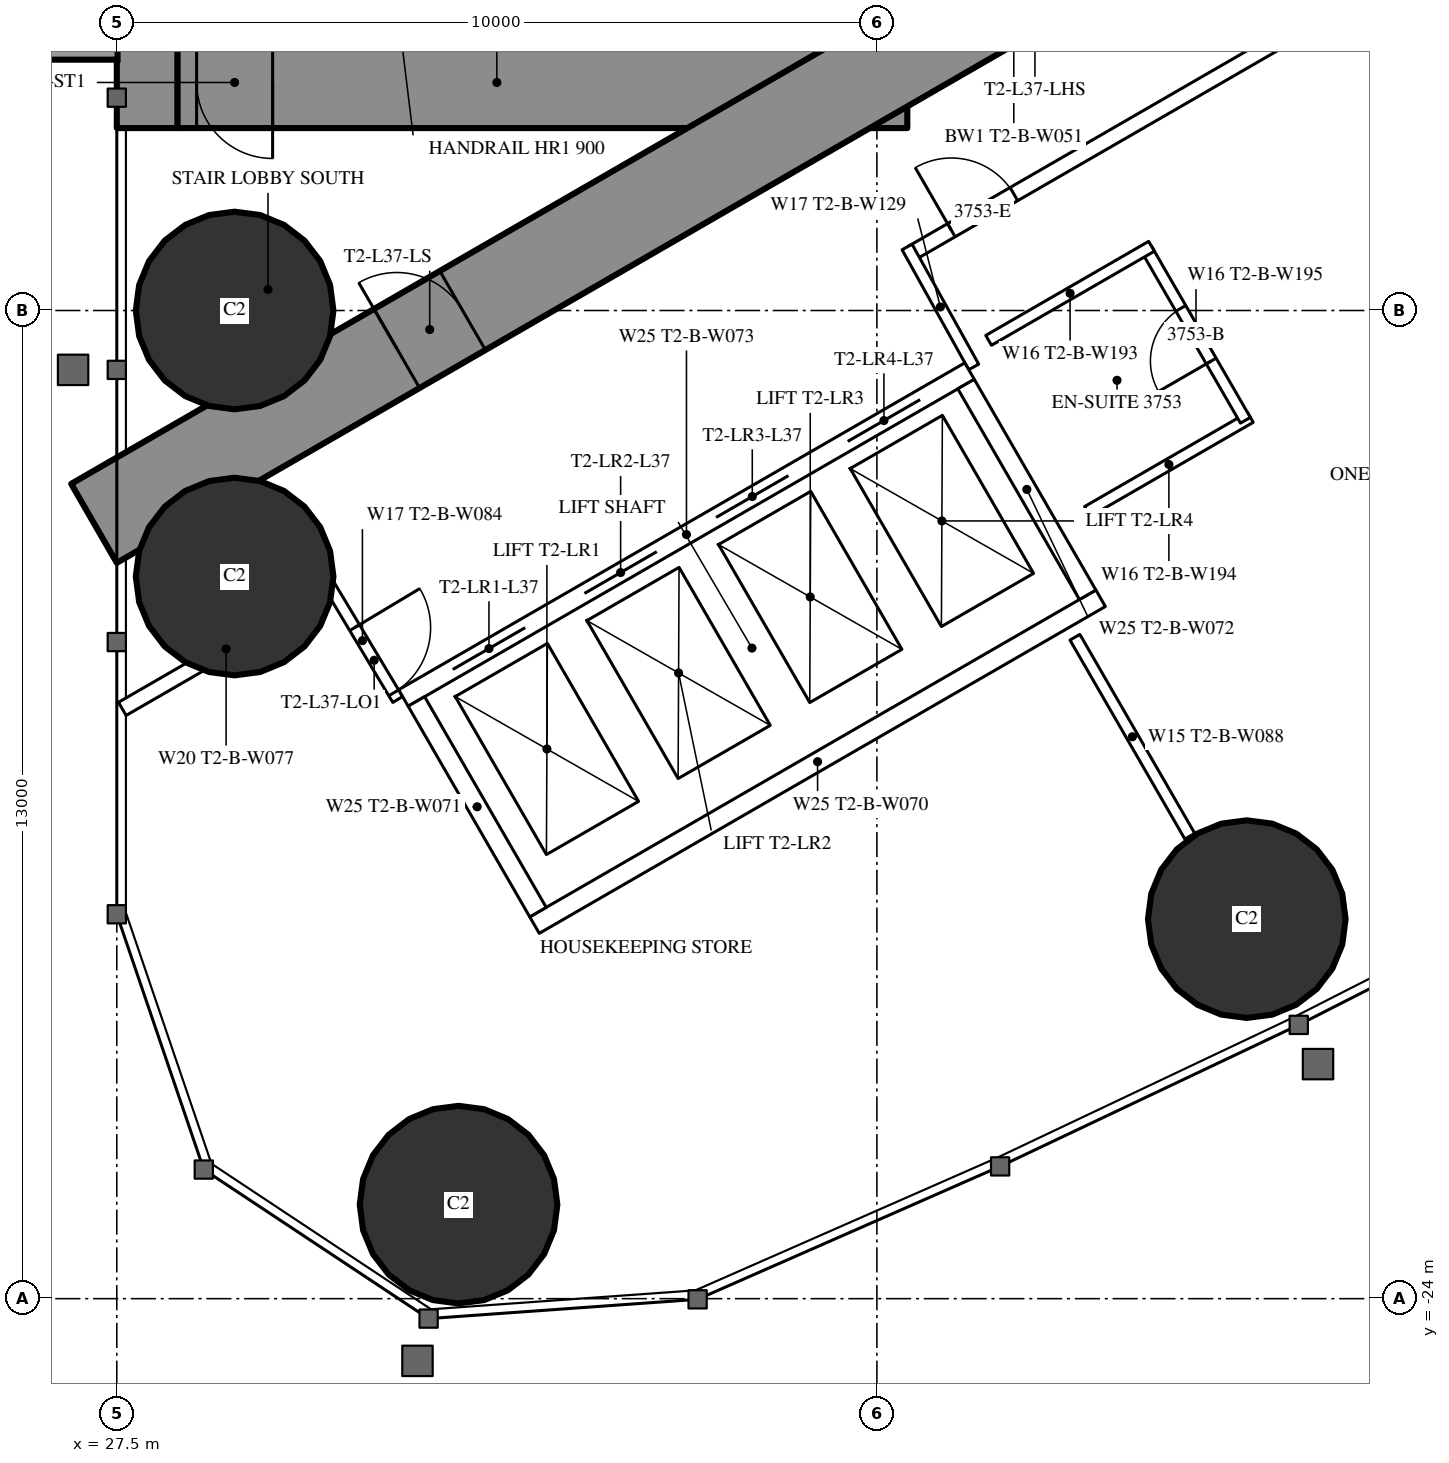
"""IFC4 building model, lengths in metres.
Left out: names, types, materials, properties, quantities, classifications, styles, units other than length and angle.
Written with IfcOpenShell. Run it as: python <this file> out.ifc"""

import sys

from ifc_helpers import new_model, si_unit, direction, frame, frame_2d, origin, origin_2d, place, context, subcontext, project, spatial, rectangle, hollow_circle, extrude, element, fill, save


model = new_model("IFC4")
c1 = context("Model", 3, precision=1e-05, world=origin(), true_north=direction((0.0, 1.0)))
c2 = subcontext(c1, "Body", "Model", "MODEL_VIEW")
j1 = project(units=[si_unit("LENGTHUNIT", "METRE"), si_unit("PLANEANGLEUNIT", "RADIAN")], contexts=[c1])
p1 = place(None, origin())
s1 = spatial("IfcSite", under=j1, at=p1, CompositionType="ELEMENT")
p2 = place(p1, origin())
s2 = spatial("IfcBuilding", under=s1, at=p2, CompositionType="ELEMENT")
p3 = place(p2, frame((0.0, 0.0, 139.6)))
s3 = spatial("IfcBuildingStorey", under=s2, at=p3, CompositionType="ELEMENT", Elevation=139.6)
for number, where, z_axis, x_axis in (
    (1, (31.996, -22.763, 0.0), (0.0, 0.0, 1.0), (1.0, 0.0, 0.0)),
    (2, (29.05, -11.0, 0.0), (0.0, 0.0, 1.0), (1.0, 0.0, 0.0)),
    (3, (29.05, -14.5, 0.0), (0.0, 0.0, 1.0), (1.0, 0.0, 0.0)),
    (4, (42.366, -19.007, 0.0), (0.0, 0.0, 1.0), (1.0, 0.0, 0.0)),
):
    element("IfcColumn", number, at=place(p3, frame(where, z_axis=z_axis, x_axis=x_axis)), inside=s3, PredefinedType="COLUMN", context=c2, shape_type="SweptSolid", body=[
        extrude(hollow_circle(Radius=1.3, WallThickness=0.1, at=origin_2d()), origin(), (0.0, 0.0, 1.0), 3.5),
    ])
p4 = place(p3, frame((27.9, -8.6, 0.0), z_axis=(0.0, 0.0, 1.0), x_axis=(0.0, 1.0, 0.0)))
e5 = element("IfcWall", 5, at=p4, inside=s3, PredefinedType="SHEAR", context=c2, shape_type="SweptSolid", body=[
    extrude(rectangle(XDim=17.2, YDim=0.8, at=frame_2d((8.6, 0.0))), origin(), (0.0, 0.0, 1.0), 3.5),
])
p5 = place(p4, frame((2.45, 0.0, 0.6)))
e6 = element("IfcOpeningElement", 6, at=p5, cuts=e5, PredefinedType="OPENING", context=c2, shape_type="SweptSolid", body=[
    extrude(rectangle(XDim=0.6, YDim=2.1, at=frame_2d((0.3, 1.05))), frame((0.0, 0.41, 0.0), z_axis=(0.0, -1.0, 0.0), x_axis=(1.0, 0.0, 0.0)), (0.0, 0.0, 1.0), 0.82),
])
p6 = place(p4, frame((14.15, 0.0, 0.6)))
e7 = element("IfcOpeningElement", 7, at=p6, cuts=e5, PredefinedType="OPENING", context=c2, shape_type="SweptSolid", body=[
    extrude(rectangle(XDim=0.6, YDim=2.1, at=frame_2d((0.3, 1.05))), frame((0.0, 0.41, 0.0), z_axis=(0.0, -1.0, 0.0), x_axis=(1.0, 0.0, 0.0)), (0.0, 0.0, 1.0), 0.82),
])
p7 = place(p3, frame((37.3, -8.6, 0.0), z_axis=(0.0, 0.0, 1.0), x_axis=(0.0, 1.0, 0.0)))
e8 = element("IfcWall", 8, at=p7, inside=s3, PredefinedType="SHEAR", context=c2, shape_type="SweptSolid", body=[
    extrude(rectangle(XDim=17.2, YDim=1.2, at=frame_2d((8.6, 0.0))), origin(), (0.0, 0.0, 1.0), 3.5),
])
p8 = place(p7, frame((7.7, 0.0, 0.0)))
e9 = element("IfcOpeningElement", 9, at=p8, cuts=e8, PredefinedType="OPENING", context=c2, shape_type="SweptSolid", body=[
    extrude(rectangle(XDim=1.8, YDim=2.2, at=frame_2d((0.9, 1.1))), frame((0.0, 0.61, 0.0), z_axis=(0.0, -1.0, 0.0), x_axis=(1.0, 0.0, 0.0)), (0.0, 0.0, 1.0), 1.22),
])
p9 = place(p3, frame((28.3, -8.0, 0.0), z_axis=(0.0, 0.0, 1.0), x_axis=(1.0, 0.0, 0.0)))
e10 = element("IfcWall", 10, at=p9, inside=s3, PredefinedType="SHEAR", context=c2, shape_type="SweptSolid", body=[
    extrude(rectangle(XDim=8.4, YDim=1.2, at=frame_2d((4.2, 0.0))), origin(), (0.0, 0.0, 1.0), 3.5),
])
p10 = place(p9, frame((0.25, 0.0, 0.0)))
e11 = element("IfcOpeningElement", 11, at=p10, cuts=e10, PredefinedType="OPENING", context=c2, shape_type="SweptSolid", body=[
    extrude(rectangle(XDim=1.0, YDim=2.2, at=frame_2d((0.5, 1.1))), frame((0.0, 0.61, 0.0), z_axis=(0.0, -1.0, 0.0), x_axis=(1.0, 0.0, 0.0)), (0.0, 0.0, 1.0), 1.22),
])
p11 = place(p3, frame((27.2, -13.8, 0.0), z_axis=(0.0, 0.0, 1.0), x_axis=(0.866027159892, 0.499996958321, 0.0)))
e12 = element("IfcWall", 12, at=p11, inside=s3, PredefinedType="SHEAR", context=c2, shape_type="SweptSolid", body=[
    extrude(rectangle(XDim=27.947, YDim=1.2, at=frame_2d((13.973, 0.0))), origin(), (0.0, 0.0, 1.0), 3.5),
])
p12 = place(p11, frame((4.6, 0.0, 0.0)))
e13 = element("IfcOpeningElement", 13, at=p12, cuts=e12, PredefinedType="OPENING", context=c2, shape_type="SweptSolid", body=[
    extrude(rectangle(XDim=1.0, YDim=2.2, at=frame_2d((0.5, 1.1))), frame((0.0, 0.61, 0.0), z_axis=(0.0, -1.0, 0.0), x_axis=(1.0, 0.0, 0.0)), (0.0, 0.0, 1.0), 1.22),
])
p13 = place(p11, frame((13.395, 0.0, 0.0)))
e14 = element("IfcOpeningElement", 14, at=p13, cuts=e12, PredefinedType="OPENING", context=c2, shape_type="SweptSolid", body=[
    extrude(rectangle(XDim=1.8, YDim=2.2, at=frame_2d((0.9, 1.1))), frame((0.0, 0.61, 0.0), z_axis=(0.0, -1.0, 0.0), x_axis=(1.0, 0.0, 0.0)), (0.0, 0.0, 1.0), 1.22),
])
p14 = place(p3, frame((40.105, -15.299, 0.0), z_axis=(0.0, 0.0, 1.0), x_axis=(0.499978822259, -0.866037630414, 0.0)))
e15 = element("IfcWall", 15, at=p14, inside=s3, PredefinedType="PARTITIONING", context=c2, shape_type="SweptSolid", body=[
    extrude(rectangle(XDim=3.023, YDim=0.15, at=frame_2d((1.511, 0.0))), origin(), (0.0, 0.0, 1.0), 3.25),
])
p15 = place(p3, frame((27.572, -16.241, 0.0), z_axis=(0.0, 0.0, 1.0), x_axis=(0.866029654818, 0.499992636921, 0.0)))
e16 = element("IfcWall", 16, at=p15, inside=s3, PredefinedType="PARTITIONING", context=c2, shape_type="SweptSolid", body=[
    extrude(rectangle(XDim=3.155, YDim=0.2, at=frame_2d((1.577, 0.0))), origin(), (0.0, 0.0, 1.0), 3.25),
])
p16 = place(p3, frame((37.96, -10.243, 0.0), z_axis=(0.0, 0.0, 1.0), x_axis=(0.866026429433, 0.499998223521, 0.0)))
e17 = element("IfcWall", 17, at=p16, inside=s3, PredefinedType="PARTITIONING", context=c2, shape_type="SweptSolid", body=[
    extrude(rectangle(XDim=20.487, YDim=0.2, at=frame_2d((10.243, 0.0))), origin(), (0.0, 0.0, 1.0), 3.25),
])
p17 = place(p16, frame((10.743, 0.0, 0.0)))
e18 = element("IfcOpeningElement", 18, at=p17, cuts=e17, PredefinedType="OPENING", context=c2, shape_type="SweptSolid", body=[
    extrude(rectangle(XDim=0.95, YDim=2.2, at=frame_2d((0.475, 1.1))), frame((0.0, 0.11, 0.0), z_axis=(0.0, -1.0, 0.0), x_axis=(1.0, 0.0, 0.0)), (0.0, 0.0, 1.0), 0.22),
])
p18 = place(p16, frame((17.586, 0.0, 0.0)))
e19 = element("IfcOpeningElement", 19, at=p18, cuts=e17, PredefinedType="OPENING", context=c2, shape_type="SweptSolid", body=[
    extrude(rectangle(XDim=1.8, YDim=2.2, at=frame_2d((0.9, 1.1))), frame((0.0, 0.11, 0.0), z_axis=(0.0, -1.0, 0.0), x_axis=(1.0, 0.0, 0.0)), (0.0, 0.0, 1.0), 0.22),
])
p19 = place(p16, frame((0.6, 0.0, 0.0)))
e20 = element("IfcOpeningElement", 20, at=p19, cuts=e17, PredefinedType="OPENING", context=c2, shape_type="SweptSolid", body=[
    extrude(rectangle(XDim=0.95, YDim=2.2, at=frame_2d((0.475, 1.1))), frame((0.0, 0.11, 0.0), z_axis=(0.0, -1.0, 0.0), x_axis=(1.0, 0.0, 0.0)), (0.0, 0.0, 1.0), 0.22),
])
p20 = place(p3, frame((38.773, -11.742, 0.0), z_axis=(0.0, 0.0, 1.0), x_axis=(-0.485528096672, 0.8742210632, 0.0)))
e21 = element("IfcWall", 21, at=p20, inside=s3, PredefinedType="PARTITIONING", context=c2, shape_type="SweptSolid", body=[
    extrude(rectangle(XDim=1.805, YDim=0.15, at=frame_2d((0.903, 0.0))), origin(), (0.0, 0.0, 1.0), 3.25),
])
p21 = place(p3, frame((30.267, -14.569, 0.0), z_axis=(0.0, 0.0, 1.0), x_axis=(0.514336634837, -0.857588377991, 0.0)))
e22 = element("IfcWall", 22, at=p21, inside=s3, PredefinedType="PARTITIONING", context=c2, shape_type="SweptSolid", body=[
    extrude(rectangle(XDim=1.805, YDim=0.15, at=frame_2d((0.903, 0.0))), origin(), (0.0, 0.0, 1.0), 3.25),
])
p22 = place(p21, frame((0.703, 0.0, 0.0)))
e23 = element("IfcOpeningElement", 23, at=p22, cuts=e22, PredefinedType="OPENING", context=c2, shape_type="SweptSolid", body=[
    extrude(rectangle(XDim=1.0, YDim=2.2, at=frame_2d((0.5, 1.1))), frame((0.0, 0.085, 0.0), z_axis=(0.0, -1.0, 0.0), x_axis=(1.0, 0.0, 0.0)), (0.0, 0.0, 1.0), 0.17),
])
p23 = place(p3, frame((40.27, -13.644, 0.0), z_axis=(0.0, 0.0, 1.0), x_axis=(0.866031185235, 0.4999899861, 0.0)))
e24 = element("IfcWall", 24, at=p23, inside=s3, PredefinedType="PARTITIONING", context=c2, shape_type="SweptSolid", body=[
    extrude(rectangle(XDim=2.475, YDim=0.15, at=frame_2d((1.238, 0.0))), origin(), (0.0, 0.0, 1.0), 3.25),
])
p24 = place(p3, frame((41.048, -10.193, 0.0), z_axis=(0.0, 0.0, 1.0), x_axis=(0.500047596559, -0.865997922154, 0.0)))
e25 = element("IfcWall", 25, at=p24, inside=s3, PredefinedType="PARTITIONING", context=c2, shape_type="SweptSolid", body=[
    extrude(rectangle(XDim=2.6, YDim=0.15, at=frame_2d((1.3, 0.0))), origin(), (0.0, 0.0, 1.0), 3.25),
])
p25 = place(p24, frame((0.9, 0.0, 0.0)))
e26 = element("IfcOpeningElement", 26, at=p25, cuts=e25, PredefinedType="OPENING", context=c2, shape_type="SweptSolid", body=[
    extrude(rectangle(XDim=0.8, YDim=2.2, at=frame_2d((0.4, 1.1))), frame((0.0, 0.085, 0.0), z_axis=(0.0, -1.0, 0.0), x_axis=(1.0, 0.0, 0.0)), (0.0, 0.0, 1.0), 0.17),
])
p26 = place(p3, frame((38.97, -11.393, 0.0), z_axis=(0.0, 0.0, 1.0), x_axis=(0.866031185235, 0.4999899861, 0.0)))
e27 = element("IfcWall", 27, at=p26, inside=s3, PredefinedType="PARTITIONING", context=c2, shape_type="SweptSolid", body=[
    extrude(rectangle(XDim=2.475, YDim=0.15, at=frame_2d((1.238, 0.0))), origin(), (0.0, 0.0, 1.0), 3.25),
])
p27 = place(p3, frame((31.271, -16.097, 0.0), z_axis=(0.0, 0.0, 1.0), x_axis=(0.86604045752, 0.499973925258, 0.0)))
e28 = element("IfcWall", 28, at=p27, inside=s3, PredefinedType="PARTITIONING", context=c2, shape_type="SweptSolid", body=[
    extrude(rectangle(XDim=8.6, YDim=0.25, at=frame_2d((4.3, 0.0))), origin(), (0.0, 0.0, 1.0), 3.25),
])
p28 = place(p27, frame((0.75, 0.0, 0.0)))
e29 = element("IfcOpeningElement", 29, at=p28, cuts=e28, PredefinedType="OPENING", context=c2, shape_type="SweptSolid", body=[
    extrude(rectangle(XDim=1.1, YDim=2.2, at=frame_2d((0.55, 1.1))), frame((0.0, 0.135, 0.0), z_axis=(0.0, -1.0, 0.0), x_axis=(1.0, 0.0, 0.0)), (0.0, 0.0, 1.0), 0.27),
])
p29 = place(p27, frame((2.75, 0.0, 0.0)))
e30 = element("IfcOpeningElement", 30, at=p29, cuts=e28, PredefinedType="OPENING", context=c2, shape_type="SweptSolid", body=[
    extrude(rectangle(XDim=1.1, YDim=2.2, at=frame_2d((0.55, 1.1))), frame((0.0, 0.135, 0.0), z_axis=(0.0, -1.0, 0.0), x_axis=(1.0, 0.0, 0.0)), (0.0, 0.0, 1.0), 0.27),
])
p30 = place(p27, frame((4.75, 0.0, 0.0)))
e31 = element("IfcOpeningElement", 31, at=p30, cuts=e28, PredefinedType="OPENING", context=c2, shape_type="SweptSolid", body=[
    extrude(rectangle(XDim=1.1, YDim=2.2, at=frame_2d((0.55, 1.1))), frame((0.0, 0.135, 0.0), z_axis=(0.0, -1.0, 0.0), x_axis=(1.0, 0.0, 0.0)), (0.0, 0.0, 1.0), 0.27),
])
p31 = place(p27, frame((6.75, 0.0, 0.0)))
e32 = element("IfcOpeningElement", 32, at=p31, cuts=e28, PredefinedType="OPENING", context=c2, shape_type="SweptSolid", body=[
    extrude(rectangle(XDim=1.1, YDim=2.2, at=frame_2d((0.55, 1.1))), frame((0.0, 0.135, 0.0), z_axis=(0.0, -1.0, 0.0), x_axis=(1.0, 0.0, 0.0)), (0.0, 0.0, 1.0), 0.27),
])
p32 = place(p3, frame((32.996, -19.086, 0.0), z_axis=(0.0, 0.0, 1.0), x_axis=(0.866028165386, 0.499995216735, 0.0)))
e33 = element("IfcWall", 33, at=p32, inside=s3, PredefinedType="PARTITIONING", context=c2, shape_type="SweptSolid", body=[
    extrude(rectangle(XDim=8.6, YDim=0.25, at=frame_2d((4.3, 0.0))), origin(), (0.0, 0.0, 1.0), 3.25),
])
for number, where, z_axis, x_axis in (
    (34, (31.441, -16.143, 0.0), (0.0, 0.0, 1.0), (0.5, -0.866, 0.0)),
    (35, (38.673, -11.968, 0.0), (0.0, 0.0, 1.0), (0.5, -0.866, 0.0)),
):
    element("IfcWall", number, at=place(p3, frame(where, z_axis=z_axis, x_axis=x_axis)), inside=s3, PredefinedType="PARTITIONING", context=c2, shape_type="SweptSolid", body=[
        extrude(rectangle(XDim=3.201, YDim=0.25, at=frame_2d((1.6, 0.0))), origin(), (0.0, 0.0, 1.0), 3.25),
    ])
p33 = place(p25, origin())
e36 = element("IfcDoor", 36, at=p33, inside=s3, OperationType="SINGLE_SWING_RIGHT", PredefinedType="DOOR", context=c2, shape_type="SweptSolid", body=[
    extrude(rectangle(XDim=0.8, YDim=2.2, at=frame_2d((0.4, 1.1))), frame((0.0, 0.025, 0.0), z_axis=(0.0, -1.0, 0.0), x_axis=(1.0, 0.0, 0.0)), (0.0, 0.0, 1.0), 0.05),
])
fill(e26, e36)
p34 = place(p19, origin())
e37 = element("IfcDoor", 37, at=p34, inside=s3, OperationType="SINGLE_SWING_LEFT", PredefinedType="DOOR", context=c2, shape_type="SweptSolid", body=[
    extrude(rectangle(XDim=0.95, YDim=2.2, at=frame_2d((0.475, 1.1))), frame((0.0, 0.025, 0.0), z_axis=(0.0, -1.0, 0.0), x_axis=(1.0, 0.0, 0.0)), (0.0, 0.0, 1.0), 0.05),
])
fill(e20, e37)
p35 = place(p22, origin())
e38 = element("IfcDoor", 38, at=p35, inside=s3, OperationType="SINGLE_SWING_LEFT", PredefinedType="DOOR", context=c2, shape_type="SweptSolid", body=[
    extrude(rectangle(XDim=1.0, YDim=2.2, at=frame_2d((0.5, 1.1))), frame((0.0, 0.025, 0.0), z_axis=(0.0, -1.0, 0.0), x_axis=(1.0, 0.0, 0.0)), (0.0, 0.0, 1.0), 0.05),
])
fill(e23, e38)
p36 = place(p12, origin())
e39 = element("IfcDoor", 39, at=p36, inside=s3, OperationType="SINGLE_SWING_LEFT", PredefinedType="DOOR", context=c2, shape_type="SweptSolid", body=[
    extrude(rectangle(XDim=1.0, YDim=2.2, at=frame_2d((0.5, 1.1))), frame((0.0, 0.025, 0.0), z_axis=(0.0, -1.0, 0.0), x_axis=(1.0, 0.0, 0.0)), (0.0, 0.0, 1.0), 0.05),
])
fill(e13, e39)
p37 = place(p10, origin())
e40 = element("IfcDoor", 40, at=p37, inside=s3, OperationType="SINGLE_SWING_RIGHT", PredefinedType="DOOR", context=c2, shape_type="SweptSolid", body=[
    extrude(rectangle(XDim=1.0, YDim=2.2, at=frame_2d((0.5, 1.1))), frame((0.0, 0.025, 0.0), z_axis=(0.0, -1.0, 0.0), x_axis=(1.0, 0.0, 0.0)), (0.0, 0.0, 1.0), 0.05),
])
fill(e11, e40)
p38 = place(p28, origin())
e41 = element("IfcDoor", 41, at=p38, inside=s3, OperationType="DOUBLE_DOOR_SLIDING", PredefinedType="USERDEFINED", context=c2, shape_type="SweptSolid", body=[
    extrude(rectangle(XDim=1.1, YDim=2.2, at=frame_2d((0.55, 1.1))), frame((0.0, 0.025, 0.0), z_axis=(0.0, -1.0, 0.0), x_axis=(1.0, 0.0, 0.0)), (0.0, 0.0, 1.0), 0.05),
])
fill(e29, e41)
p39 = place(p29, origin())
e42 = element("IfcDoor", 42, at=p39, inside=s3, OperationType="DOUBLE_DOOR_SLIDING", PredefinedType="USERDEFINED", context=c2, shape_type="SweptSolid", body=[
    extrude(rectangle(XDim=1.1, YDim=2.2, at=frame_2d((0.55, 1.1))), frame((0.0, 0.025, 0.0), z_axis=(0.0, -1.0, 0.0), x_axis=(1.0, 0.0, 0.0)), (0.0, 0.0, 1.0), 0.05),
])
fill(e30, e42)
p40 = place(p30, origin())
e43 = element("IfcDoor", 43, at=p40, inside=s3, OperationType="DOUBLE_DOOR_SLIDING", PredefinedType="USERDEFINED", context=c2, shape_type="SweptSolid", body=[
    extrude(rectangle(XDim=1.1, YDim=2.2, at=frame_2d((0.55, 1.1))), frame((0.0, 0.025, 0.0), z_axis=(0.0, -1.0, 0.0), x_axis=(1.0, 0.0, 0.0)), (0.0, 0.0, 1.0), 0.05),
])
fill(e31, e43)
p41 = place(p31, origin())
e44 = element("IfcDoor", 44, at=p41, inside=s3, OperationType="DOUBLE_DOOR_SLIDING", PredefinedType="USERDEFINED", context=c2, shape_type="SweptSolid", body=[
    extrude(rectangle(XDim=1.1, YDim=2.2, at=frame_2d((0.55, 1.1))), frame((0.0, 0.025, 0.0), z_axis=(0.0, -1.0, 0.0), x_axis=(1.0, 0.0, 0.0)), (0.0, 0.0, 1.0), 0.05),
])
fill(e32, e44)
save(model, sys.argv[1])
